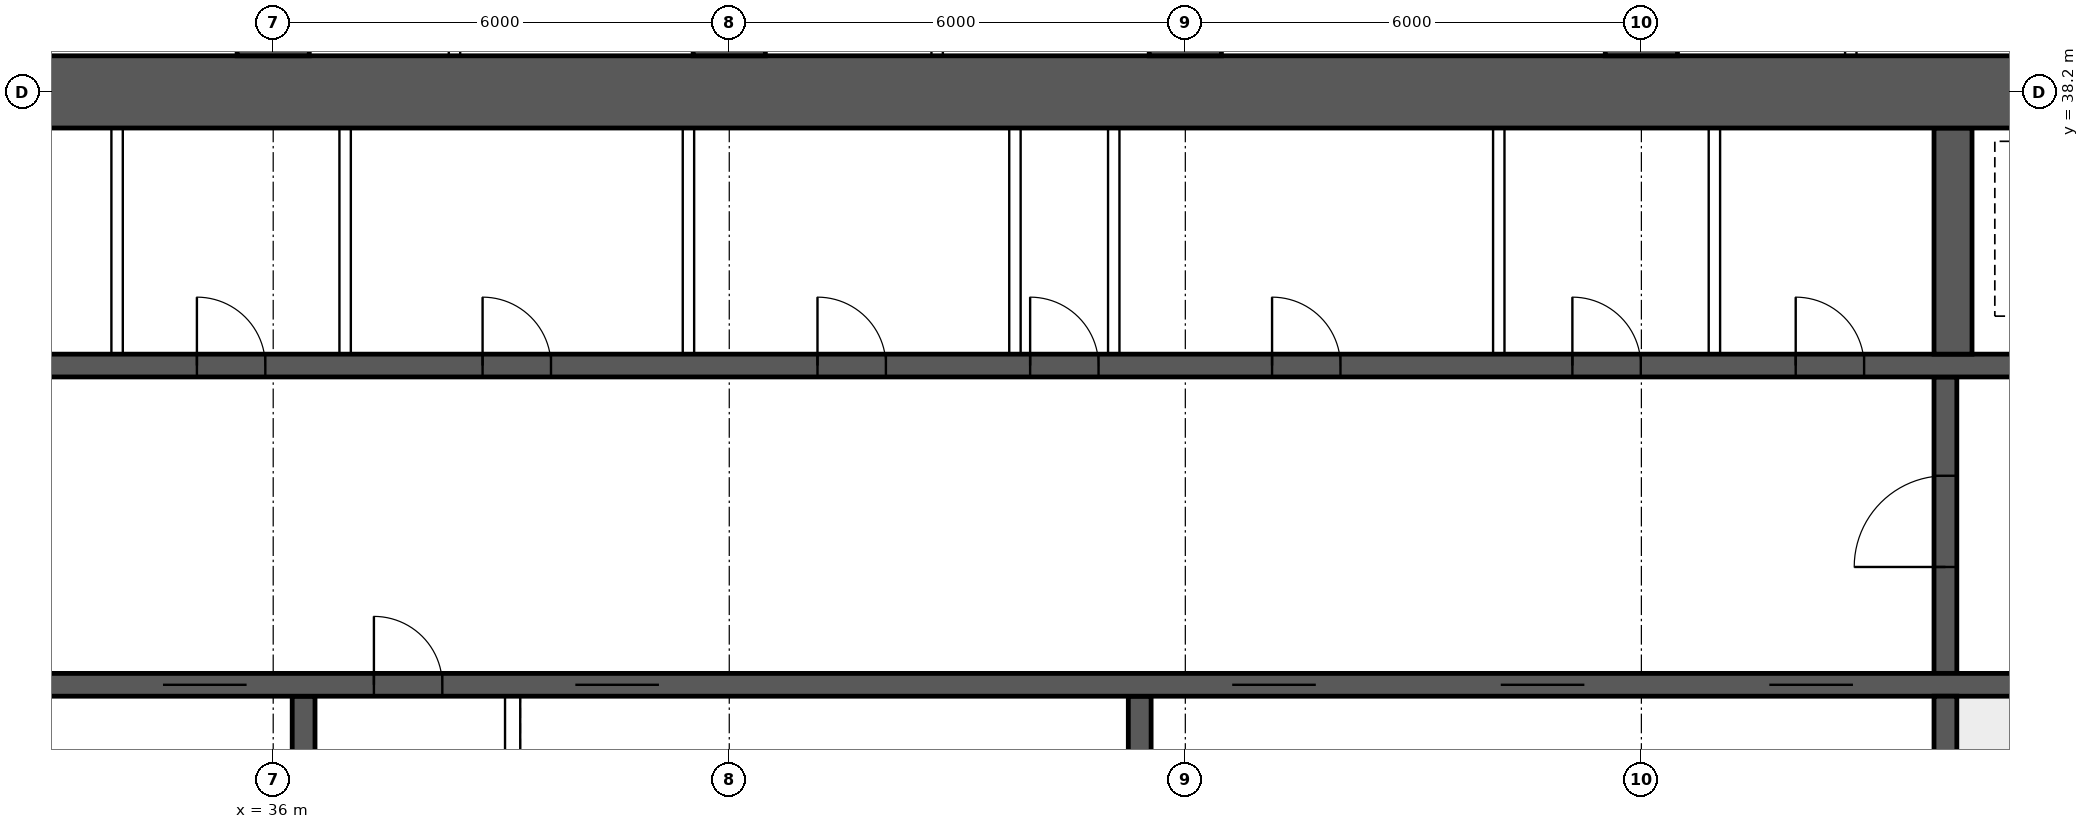
"""IFC4 building model, lengths in metres.
Left out: names, types, materials, properties, quantities, classifications, styles, units other than length and angle.
Written with IfcOpenShell. Run it as: python <this file> out.ifc"""

import sys

from ifc_helpers import new_model, si_unit, direction, frame, frame_2d, origin, place, context, subcontext, project, spatial, rectangle, extrude, element, fill, save


model = new_model("IFC4")
c1 = context("Model", 3, precision=1e-05, world=origin(), true_north=direction((0.0, 1.0)))
c2 = subcontext(c1, "Body", "Model", "MODEL_VIEW")
j1 = project(units=[si_unit("LENGTHUNIT", "METRE"), si_unit("PLANEANGLEUNIT", "RADIAN")], contexts=[c1])
p1 = place(None, origin())
s1 = spatial("IfcSite", under=j1, at=p1, CompositionType="ELEMENT")
p2 = place(p1, origin())
s2 = spatial("IfcBuilding", under=s1, at=p2, CompositionType="ELEMENT")
p3 = place(p2, frame((0.0, 0.0, 140.35)))
s3 = spatial("IfcBuildingStorey", under=s2, at=p3, CompositionType="ELEMENT", Elevation=140.35)
p4 = place(p3, frame((18.0, 38.2, 0.0), z_axis=(0.0, 0.0, 1.0), x_axis=(1.0, 0.0, 0.0)))
e1 = element("IfcWall", 1, at=p4, inside=s3, PredefinedType="SHEAR", context=c2, shape_type="SweptSolid", body=[
    extrude(rectangle(XDim=48.0, YDim=0.95, at=frame_2d((24.0, 0.0))), origin(), (0.0, 0.0, 1.0), 4.5),
])
p5 = place(p3, frame((18.475, 30.4, 0.0), z_axis=(0.0, 0.0, 1.0), x_axis=(1.0, 0.0, 0.0)))
e2 = element("IfcWall", 2, at=p5, inside=s3, PredefinedType="SHEAR", context=c2, shape_type="SweptSolid", body=[
    extrude(rectangle(XDim=47.05, YDim=0.3, at=frame_2d((23.525, 0.0))), origin(), (0.0, 0.0, 1.0), 4.5),
])
p6 = place(p5, frame((0.4, 0.0, 0.0)))
e3 = element("IfcOpeningElement", 3, at=p6, cuts=e2, PredefinedType="OPENING", context=c2, shape_type="SweptSolid", body=[
    extrude(rectangle(XDim=1.0, YDim=2.1, at=frame_2d((0.5, 1.05))), frame((0.0, 0.16, 0.0), z_axis=(0.0, -1.0, 0.0), x_axis=(1.0, 0.0, 0.0)), (0.0, 0.0, 1.0), 0.32),
])
p7 = place(p5, frame((45.65, 0.0, 0.0)))
e4 = element("IfcOpeningElement", 4, at=p7, cuts=e2, PredefinedType="OPENING", context=c2, shape_type="SweptSolid", body=[
    extrude(rectangle(XDim=1.0, YDim=2.1, at=frame_2d((0.5, 1.05))), frame((0.0, 0.16, 0.0), z_axis=(0.0, -1.0, 0.0), x_axis=(1.0, 0.0, 0.0)), (0.0, 0.0, 1.0), 0.32),
])
p8 = place(p5, frame((8.275, 0.0, 0.0)))
e5 = element("IfcOpeningElement", 5, at=p8, cuts=e2, PredefinedType="OPENING", context=c2, shape_type="SweptSolid", body=[
    extrude(rectangle(XDim=1.1, YDim=2.1, at=frame_2d((0.55, 1.05))), frame((0.0, 0.16, 0.0), z_axis=(0.0, -1.0, 0.0), x_axis=(1.0, 0.0, 0.0)), (0.0, 0.0, 1.0), 0.32),
])
p9 = place(p5, frame((10.875, 0.0, 0.0)))
e6 = element("IfcOpeningElement", 6, at=p9, cuts=e2, PredefinedType="OPENING", context=c2, shape_type="SweptSolid", body=[
    extrude(rectangle(XDim=1.1, YDim=2.1, at=frame_2d((0.55, 1.05))), frame((0.0, 0.16, 0.0), z_axis=(0.0, -1.0, 0.0), x_axis=(1.0, 0.0, 0.0)), (0.0, 0.0, 1.0), 0.32),
])
p10 = place(p5, frame((13.475, 0.0, 0.0)))
e7 = element("IfcOpeningElement", 7, at=p10, cuts=e2, PredefinedType="OPENING", context=c2, shape_type="SweptSolid", body=[
    extrude(rectangle(XDim=1.1, YDim=2.1, at=frame_2d((0.55, 1.05))), frame((0.0, 0.16, 0.0), z_axis=(0.0, -1.0, 0.0), x_axis=(1.0, 0.0, 0.0)), (0.0, 0.0, 1.0), 0.32),
])
p11 = place(p5, frame((16.075, 0.0, 0.0)))
e8 = element("IfcOpeningElement", 8, at=p11, cuts=e2, PredefinedType="OPENING", context=c2, shape_type="SweptSolid", body=[
    extrude(rectangle(XDim=1.1, YDim=2.1, at=frame_2d((0.55, 1.05))), frame((0.0, 0.16, 0.0), z_axis=(0.0, -1.0, 0.0), x_axis=(1.0, 0.0, 0.0)), (0.0, 0.0, 1.0), 0.32),
])
p12 = place(p5, frame((18.85, 0.0, 0.0)))
e9 = element("IfcOpeningElement", 9, at=p12, cuts=e2, PredefinedType="OPENING", context=c2, shape_type="SweptSolid", body=[
    extrude(rectangle(XDim=0.9, YDim=2.1, at=frame_2d((0.45, 1.05))), frame((0.0, 0.16, 0.0), z_axis=(0.0, -1.0, 0.0), x_axis=(1.0, 0.0, 0.0)), (0.0, 0.0, 1.0), 0.32),
])
p13 = place(p5, frame((21.5, 0.0, 0.0)))
e10 = element("IfcOpeningElement", 10, at=p13, cuts=e2, PredefinedType="OPENING", context=c2, shape_type="SweptSolid", body=[
    extrude(rectangle(XDim=1.1, YDim=2.1, at=frame_2d((0.55, 1.05))), frame((0.0, 0.16, 0.0), z_axis=(0.0, -1.0, 0.0), x_axis=(1.0, 0.0, 0.0)), (0.0, 0.0, 1.0), 0.32),
])
p14 = place(p5, frame((30.142, 0.0, 0.0)))
e11 = element("IfcOpeningElement", 11, at=p14, cuts=e2, PredefinedType="OPENING", context=c2, shape_type="SweptSolid", body=[
    extrude(rectangle(XDim=1.1, YDim=2.1, at=frame_2d((0.55, 1.05))), frame((0.0, 0.16, 0.0), z_axis=(0.0, -1.0, 0.0), x_axis=(1.0, 0.0, 0.0)), (0.0, 0.0, 1.0), 0.32),
])
p15 = place(p5, frame((33.675, 0.0, 0.0)))
e12 = element("IfcOpeningElement", 12, at=p15, cuts=e2, PredefinedType="OPENING", context=c2, shape_type="SweptSolid", body=[
    extrude(rectangle(XDim=1.1, YDim=2.1, at=frame_2d((0.55, 1.05))), frame((0.0, 0.16, 0.0), z_axis=(0.0, -1.0, 0.0), x_axis=(1.0, 0.0, 0.0)), (0.0, 0.0, 1.0), 0.32),
])
p16 = place(p5, frame((37.208, 0.0, 0.0)))
e13 = element("IfcOpeningElement", 13, at=p16, cuts=e2, PredefinedType="OPENING", context=c2, shape_type="SweptSolid", body=[
    extrude(rectangle(XDim=1.1, YDim=2.1, at=frame_2d((0.55, 1.05))), frame((0.0, 0.16, 0.0), z_axis=(0.0, -1.0, 0.0), x_axis=(1.0, 0.0, 0.0)), (0.0, 0.0, 1.0), 0.32),
])
p17 = place(p3, frame((18.475, 34.6, 0.0), z_axis=(0.0, 0.0, 1.0), x_axis=(1.0, 0.0, 0.0)))
e14 = element("IfcWall", 14, at=p17, inside=s3, PredefinedType="SHEAR", context=c2, shape_type="SweptSolid", body=[
    extrude(rectangle(XDim=47.05, YDim=0.3, at=frame_2d((23.525, 0.0))), origin(), (0.0, 0.0, 1.0), 4.5),
])
p18 = place(p17, frame((0.9, 0.0, 0.0)))
e15 = element("IfcOpeningElement", 15, at=p18, cuts=e14, PredefinedType="OPENING", context=c2, shape_type="SweptSolid", body=[
    extrude(rectangle(XDim=1.1, YDim=2.1, at=frame_2d((0.55, 1.05))), frame((0.0, 0.16, 0.0), z_axis=(0.0, -1.0, 0.0), x_axis=(1.0, 0.0, 0.0)), (0.0, 0.0, 1.0), 0.32),
])
p19 = place(p17, frame((45.05, 0.0, 0.0)))
e16 = element("IfcOpeningElement", 16, at=p19, cuts=e14, PredefinedType="OPENING", context=c2, shape_type="SweptSolid", body=[
    extrude(rectangle(XDim=1.1, YDim=2.1, at=frame_2d((0.55, 1.05))), frame((0.0, 0.16, 0.0), z_axis=(0.0, -1.0, 0.0), x_axis=(1.0, 0.0, 0.0)), (0.0, 0.0, 1.0), 0.32),
])
p20 = place(p17, frame((4.125, 0.0, 0.0)))
e17 = element("IfcOpeningElement", 17, at=p20, cuts=e14, PredefinedType="OPENING", context=c2, shape_type="SweptSolid", body=[
    extrude(rectangle(XDim=0.9, YDim=2.1, at=frame_2d((0.45, 1.05))), frame((0.0, 0.16, 0.0), z_axis=(0.0, -1.0, 0.0), x_axis=(1.0, 0.0, 0.0)), (0.0, 0.0, 1.0), 0.32),
])
p21 = place(p17, frame((42.025, 0.0, 0.0)))
e18 = element("IfcOpeningElement", 18, at=p21, cuts=e14, PredefinedType="OPENING", context=c2, shape_type="SweptSolid", body=[
    extrude(rectangle(XDim=0.9, YDim=2.1, at=frame_2d((0.45, 1.05))), frame((0.0, 0.16, 0.0), z_axis=(0.0, -1.0, 0.0), x_axis=(1.0, 0.0, 0.0)), (0.0, 0.0, 1.0), 0.32),
])
p22 = place(p17, frame((8.9, 0.0, 0.0)))
e19 = element("IfcOpeningElement", 19, at=p22, cuts=e14, PredefinedType="OPENING", context=c2, shape_type="SweptSolid", body=[
    extrude(rectangle(XDim=0.9, YDim=2.1, at=frame_2d((0.45, 1.05))), frame((0.0, 0.16, 0.0), z_axis=(0.0, -1.0, 0.0), x_axis=(1.0, 0.0, 0.0)), (0.0, 0.0, 1.0), 0.32),
])
p23 = place(p17, frame((12.874, 0.0, 0.0)))
e20 = element("IfcOpeningElement", 20, at=p23, cuts=e14, PredefinedType="OPENING", context=c2, shape_type="SweptSolid", body=[
    extrude(rectangle(XDim=0.9, YDim=2.1, at=frame_2d((0.45, 1.05))), frame((0.0, 0.16, 0.0), z_axis=(0.0, -1.0, 0.0), x_axis=(1.0, 0.0, 0.0)), (0.0, 0.0, 1.0), 0.32),
])
p24 = place(p17, frame((16.521, 0.0, 0.0)))
e21 = element("IfcOpeningElement", 21, at=p24, cuts=e14, PredefinedType="OPENING", context=c2, shape_type="SweptSolid", body=[
    extrude(rectangle(XDim=0.9, YDim=2.1, at=frame_2d((0.45, 1.05))), frame((0.0, 0.16, 0.0), z_axis=(0.0, -1.0, 0.0), x_axis=(1.0, 0.0, 0.0)), (0.0, 0.0, 1.0), 0.32),
])
p25 = place(p17, frame((20.28, 0.0, 0.0)))
e22 = element("IfcOpeningElement", 22, at=p25, cuts=e14, PredefinedType="OPENING", context=c2, shape_type="SweptSolid", body=[
    extrude(rectangle(XDim=0.9, YDim=2.1, at=frame_2d((0.45, 1.05))), frame((0.0, 0.16, 0.0), z_axis=(0.0, -1.0, 0.0), x_axis=(1.0, 0.0, 0.0)), (0.0, 0.0, 1.0), 0.32),
])
p26 = place(p17, frame((24.686, 0.0, 0.0)))
e23 = element("IfcOpeningElement", 23, at=p26, cuts=e14, PredefinedType="OPENING", context=c2, shape_type="SweptSolid", body=[
    extrude(rectangle(XDim=0.9, YDim=2.1, at=frame_2d((0.45, 1.05))), frame((0.0, 0.16, 0.0), z_axis=(0.0, -1.0, 0.0), x_axis=(1.0, 0.0, 0.0)), (0.0, 0.0, 1.0), 0.32),
])
p27 = place(p17, frame((27.483, 0.0, 0.0)))
e24 = element("IfcOpeningElement", 24, at=p27, cuts=e14, PredefinedType="OPENING", context=c2, shape_type="SweptSolid", body=[
    extrude(rectangle(XDim=0.9, YDim=2.1, at=frame_2d((0.45, 1.05))), frame((0.0, 0.16, 0.0), z_axis=(0.0, -1.0, 0.0), x_axis=(1.0, 0.0, 0.0)), (0.0, 0.0, 1.0), 0.32),
])
p28 = place(p17, frame((30.666, 0.0, 0.0)))
e25 = element("IfcOpeningElement", 25, at=p28, cuts=e14, PredefinedType="OPENING", context=c2, shape_type="SweptSolid", body=[
    extrude(rectangle(XDim=0.9, YDim=2.1, at=frame_2d((0.45, 1.05))), frame((0.0, 0.16, 0.0), z_axis=(0.0, -1.0, 0.0), x_axis=(1.0, 0.0, 0.0)), (0.0, 0.0, 1.0), 0.32),
])
p29 = place(p17, frame((34.617, 0.0, 0.0)))
e26 = element("IfcOpeningElement", 26, at=p29, cuts=e14, PredefinedType="OPENING", context=c2, shape_type="SweptSolid", body=[
    extrude(rectangle(XDim=0.9, YDim=2.1, at=frame_2d((0.45, 1.05))), frame((0.0, 0.16, 0.0), z_axis=(0.0, -1.0, 0.0), x_axis=(1.0, 0.0, 0.0)), (0.0, 0.0, 1.0), 0.32),
])
p30 = place(p17, frame((37.555, 0.0, 0.0)))
e27 = element("IfcOpeningElement", 27, at=p30, cuts=e14, PredefinedType="OPENING", context=c2, shape_type="SweptSolid", body=[
    extrude(rectangle(XDim=0.9, YDim=2.1, at=frame_2d((0.45, 1.05))), frame((0.0, 0.16, 0.0), z_axis=(0.0, -1.0, 0.0), x_axis=(1.0, 0.0, 0.0)), (0.0, 0.0, 1.0), 0.32),
])
p31 = place(p3, frame((58.0, 26.275, 0.0), z_axis=(0.0, 0.0, 1.0), x_axis=(0.0, 1.0, 0.0)))
e28 = element("IfcWall", 28, at=p31, inside=s3, PredefinedType="SHEAR", context=c2, shape_type="SweptSolid", body=[
    extrude(rectangle(XDim=3.975, YDim=0.3, at=frame_2d((1.988, 0.0))), origin(), (0.0, 0.0, 1.0), 4.5),
])
p32 = place(p3, frame((58.0, 30.55, 0.0), z_axis=(0.0, 0.0, 1.0), x_axis=(0.0, 1.0, 0.0)))
e29 = element("IfcWall", 29, at=p32, inside=s3, PredefinedType="SHEAR", context=c2, shape_type="SweptSolid", body=[
    extrude(rectangle(XDim=3.9, YDim=0.3, at=frame_2d((1.95, 0.0))), origin(), (0.0, 0.0, 1.0), 4.5),
])
p33 = place(p32, frame((1.4, 0.0, 0.0)))
e30 = element("IfcOpeningElement", 30, at=p33, cuts=e29, PredefinedType="OPENING", context=c2, shape_type="SweptSolid", body=[
    extrude(rectangle(XDim=1.2, YDim=2.1, at=frame_2d((0.6, 1.05))), frame((0.0, 0.16, 0.0), z_axis=(0.0, -1.0, 0.0), x_axis=(1.0, 0.0, 0.0)), (0.0, 0.0, 1.0), 0.32),
])
p34 = place(p3, frame((58.1, 34.75, 0.0), z_axis=(0.0, 0.0, 1.0), x_axis=(0.0, 1.0, 0.0)))
e31 = element("IfcWall", 31, at=p34, inside=s3, PredefinedType="SHEAR", context=c2, shape_type="SweptSolid", body=[
    extrude(rectangle(XDim=2.975, YDim=0.5, at=frame_2d((1.488, 0.0))), origin(), (0.0, 0.0, 1.0), 4.5),
])
for number, where, z_axis, x_axis in (
    (32, (36.4, 26.275, 0.0), (0.0, 0.0, 1.0), (0.0, 1.0, 0.0)),
    (33, (47.4, 26.275, 0.0), (0.0, 0.0, 1.0), (0.0, 1.0, 0.0)),
):
    element("IfcWall", number, at=place(p3, frame(where, z_axis=z_axis, x_axis=x_axis)), inside=s3, PredefinedType="SHEAR", context=c2, shape_type="SweptSolid", body=[
        extrude(rectangle(XDim=3.975, YDim=0.3, at=frame_2d((1.988, 0.0))), origin(), (0.0, 0.0, 1.0), 4.5),
    ])
for number, where, z_axis, x_axis in (
    (34, (36.0, 38.675, 0.0), (0.0, 0.0, 1.0), (0.0, 1.0, 0.0)),
    (35, (42.0, 38.675, 0.0), (0.0, 0.0, 1.0), (0.0, 1.0, 0.0)),
    (36, (48.0, 38.675, 0.0), (0.0, 0.0, 1.0), (0.0, 1.0, 0.0)),
    (37, (54.0, 38.675, 0.0), (0.0, 0.0, 1.0), (0.0, 1.0, 0.0)),
):
    element("IfcWall", number, at=place(p3, frame(where, z_axis=z_axis, x_axis=x_axis)), inside=s3, PredefinedType="SHEAR", context=c2, shape_type="SweptSolid", body=[
        extrude(rectangle(XDim=8.125, YDim=0.95, at=frame_2d((4.062, 0.0))), origin(), (0.0, 0.0, 1.0), 4.5),
    ])
for number, where, z_axis, x_axis in (
    (38, (33.946, 34.75, 0.0), (0.0, 0.0, 1.0), (0.0, 1.0, 0.0)),
    (39, (36.946, 34.75, 0.0), (0.0, 0.0, 1.0), (0.0, 1.0, 0.0)),
    (40, (41.463, 34.75, 0.0), (0.0, 0.0, 1.0), (0.0, 1.0, 0.0)),
    (41, (45.758, 34.75, 0.0), (0.0, 0.0, 1.0), (0.0, 1.0, 0.0)),
    (42, (47.058, 34.75, 0.0), (0.0, 0.0, 1.0), (0.0, 1.0, 0.0)),
    (43, (52.124, 34.75, 0.0), (0.0, 0.0, 1.0), (0.0, 1.0, 0.0)),
    (44, (54.961, 34.75, 0.0), (0.0, 0.0, 1.0), (0.0, 1.0, 0.0)),
):
    element("IfcWall", number, at=place(p3, frame(where, z_axis=z_axis, x_axis=x_axis)), inside=s3, PredefinedType="SOLIDWALL", context=c2, shape_type="SweptSolid", body=[
        extrude(rectangle(XDim=2.975, YDim=0.15, at=frame_2d((1.488, 0.0))), origin(), (0.0, 0.0, 1.0), 4.25),
    ])
p35 = place(p3, frame((39.15, 26.275, 0.0), z_axis=(0.0, 0.0, 1.0), x_axis=(0.0, 1.0, 0.0)))
e45 = element("IfcWall", 45, at=p35, inside=s3, PredefinedType="SOLIDWALL", context=c2, shape_type="SweptSolid", body=[
    extrude(rectangle(XDim=3.975, YDim=0.2, at=frame_2d((1.988, 0.0))), origin(), (0.0, 0.0, 1.0), 4.25),
])
for number, where, z_axis, x_axis in (
    (46, (38.385, 38.675, 0.0), (0.0, 0.0, 1.0), (0.0, 1.0, 0.0)),
    (47, (44.735, 38.675, 0.0), (0.0, 0.0, 1.0), (0.0, 1.0, 0.0)),
    (48, (56.755, 38.675, 0.0), (0.0, 0.0, 1.0), (0.0, 1.0, 0.0)),
):
    element("IfcWall", number, at=place(p3, frame(where, z_axis=z_axis, x_axis=x_axis)), inside=s3, PredefinedType="PARTITIONING", context=c2, shape_type="SweptSolid", body=[
        extrude(rectangle(XDim=8.025, YDim=0.15, at=frame_2d((4.012, 0.0))), origin(), (0.0, 0.0, 1.0), 4.25),
    ])
p36 = place(p33, origin())
e49 = element("IfcDoor", 49, at=p36, inside=s3, OperationType="SINGLE_SWING_LEFT", PredefinedType="DOOR", context=c2, shape_type="SweptSolid", body=[
    extrude(rectangle(XDim=1.2, YDim=2.1, at=frame_2d((0.6, 1.05))), frame((0.0, 0.025, 0.0), z_axis=(0.0, -1.0, 0.0), x_axis=(1.0, 0.0, 0.0)), (0.0, 0.0, 1.0), 0.05),
])
fill(e30, e49)
p37 = place(p24, origin())
e50 = element("IfcDoor", 50, at=p37, inside=s3, OperationType="SINGLE_SWING_LEFT", PredefinedType="DOOR", context=c2, shape_type="SweptSolid", body=[
    extrude(rectangle(XDim=0.9, YDim=2.1, at=frame_2d((0.45, 1.05))), frame((0.0, 0.025, 0.0), z_axis=(0.0, -1.0, 0.0), x_axis=(1.0, 0.0, 0.0)), (0.0, 0.0, 1.0), 0.05),
])
fill(e21, e50)
p38 = place(p25, origin())
e51 = element("IfcDoor", 51, at=p38, inside=s3, OperationType="SINGLE_SWING_LEFT", PredefinedType="DOOR", context=c2, shape_type="SweptSolid", body=[
    extrude(rectangle(XDim=0.9, YDim=2.1, at=frame_2d((0.45, 1.05))), frame((0.0, 0.025, 0.0), z_axis=(0.0, -1.0, 0.0), x_axis=(1.0, 0.0, 0.0)), (0.0, 0.0, 1.0), 0.05),
])
fill(e22, e51)
p39 = place(p26, origin())
e52 = element("IfcDoor", 52, at=p39, inside=s3, OperationType="SINGLE_SWING_LEFT", PredefinedType="DOOR", context=c2, shape_type="SweptSolid", body=[
    extrude(rectangle(XDim=0.9, YDim=2.1, at=frame_2d((0.45, 1.05))), frame((0.0, 0.025, 0.0), z_axis=(0.0, -1.0, 0.0), x_axis=(1.0, 0.0, 0.0)), (0.0, 0.0, 1.0), 0.05),
])
fill(e23, e52)
p40 = place(p27, origin())
e53 = element("IfcDoor", 53, at=p40, inside=s3, OperationType="SINGLE_SWING_LEFT", PredefinedType="DOOR", context=c2, shape_type="SweptSolid", body=[
    extrude(rectangle(XDim=0.9, YDim=2.1, at=frame_2d((0.45, 1.05))), frame((0.0, 0.025, 0.0), z_axis=(0.0, -1.0, 0.0), x_axis=(1.0, 0.0, 0.0)), (0.0, 0.0, 1.0), 0.05),
])
fill(e24, e53)
p41 = place(p28, origin())
e54 = element("IfcDoor", 54, at=p41, inside=s3, OperationType="SINGLE_SWING_LEFT", PredefinedType="DOOR", context=c2, shape_type="SweptSolid", body=[
    extrude(rectangle(XDim=0.9, YDim=2.1, at=frame_2d((0.45, 1.05))), frame((0.0, 0.025, 0.0), z_axis=(0.0, -1.0, 0.0), x_axis=(1.0, 0.0, 0.0)), (0.0, 0.0, 1.0), 0.05),
])
fill(e25, e54)
p42 = place(p29, origin())
e55 = element("IfcDoor", 55, at=p42, inside=s3, OperationType="SINGLE_SWING_LEFT", PredefinedType="DOOR", context=c2, shape_type="SweptSolid", body=[
    extrude(rectangle(XDim=0.9, YDim=2.1, at=frame_2d((0.45, 1.05))), frame((0.0, 0.025, 0.0), z_axis=(0.0, -1.0, 0.0), x_axis=(1.0, 0.0, 0.0)), (0.0, 0.0, 1.0), 0.05),
])
fill(e26, e55)
p43 = place(p30, origin())
e56 = element("IfcDoor", 56, at=p43, inside=s3, OperationType="SINGLE_SWING_LEFT", PredefinedType="DOOR", context=c2, shape_type="SweptSolid", body=[
    extrude(rectangle(XDim=0.9, YDim=2.1, at=frame_2d((0.45, 1.05))), frame((0.0, 0.025, 0.0), z_axis=(0.0, -1.0, 0.0), x_axis=(1.0, 0.0, 0.0)), (0.0, 0.0, 1.0), 0.05),
])
fill(e27, e56)
p44 = place(p11, origin())
e57 = element("IfcDoor", 57, at=p44, inside=s3, OperationType="DOUBLE_DOOR_SLIDING", PredefinedType="DOOR", context=c2, shape_type="SweptSolid", body=[
    extrude(rectangle(XDim=1.1, YDim=2.1, at=frame_2d((0.55, 1.05))), frame((0.0, 0.025, 0.0), z_axis=(0.0, -1.0, 0.0), x_axis=(1.0, 0.0, 0.0)), (0.0, 0.0, 1.0), 0.05),
])
fill(e8, e57)
p45 = place(p12, origin())
e58 = element("IfcDoor", 58, at=p45, inside=s3, OperationType="SINGLE_SWING_LEFT", PredefinedType="DOOR", context=c2, shape_type="SweptSolid", body=[
    extrude(rectangle(XDim=0.9, YDim=2.1, at=frame_2d((0.45, 1.05))), frame((0.0, 0.025, 0.0), z_axis=(0.0, -1.0, 0.0), x_axis=(1.0, 0.0, 0.0)), (0.0, 0.0, 1.0), 0.05),
])
fill(e9, e58)
p46 = place(p13, origin())
e59 = element("IfcDoor", 59, at=p46, inside=s3, OperationType="DOUBLE_DOOR_SLIDING", PredefinedType="DOOR", context=c2, shape_type="SweptSolid", body=[
    extrude(rectangle(XDim=1.1, YDim=2.1, at=frame_2d((0.55, 1.05))), frame((0.0, 0.025, 0.0), z_axis=(0.0, -1.0, 0.0), x_axis=(1.0, 0.0, 0.0)), (0.0, 0.0, 1.0), 0.05),
])
fill(e10, e59)
p47 = place(p14, origin())
e60 = element("IfcDoor", 60, at=p47, inside=s3, OperationType="DOUBLE_DOOR_SLIDING", PredefinedType="DOOR", context=c2, shape_type="SweptSolid", body=[
    extrude(rectangle(XDim=1.1, YDim=2.1, at=frame_2d((0.55, 1.05))), frame((0.0, 0.025, 0.0), z_axis=(0.0, -1.0, 0.0), x_axis=(1.0, 0.0, 0.0)), (0.0, 0.0, 1.0), 0.05),
])
fill(e11, e60)
p48 = place(p15, origin())
e61 = element("IfcDoor", 61, at=p48, inside=s3, OperationType="DOUBLE_DOOR_SLIDING", PredefinedType="DOOR", context=c2, shape_type="SweptSolid", body=[
    extrude(rectangle(XDim=1.1, YDim=2.1, at=frame_2d((0.55, 1.05))), frame((0.0, 0.025, 0.0), z_axis=(0.0, -1.0, 0.0), x_axis=(1.0, 0.0, 0.0)), (0.0, 0.0, 1.0), 0.05),
])
fill(e12, e61)
p49 = place(p16, origin())
e62 = element("IfcDoor", 62, at=p49, inside=s3, OperationType="DOUBLE_DOOR_SLIDING", PredefinedType="DOOR", context=c2, shape_type="SweptSolid", body=[
    extrude(rectangle(XDim=1.1, YDim=2.1, at=frame_2d((0.55, 1.05))), frame((0.0, 0.025, 0.0), z_axis=(0.0, -1.0, 0.0), x_axis=(1.0, 0.0, 0.0)), (0.0, 0.0, 1.0), 0.05),
])
fill(e13, e62)
save(model, sys.argv[1])
